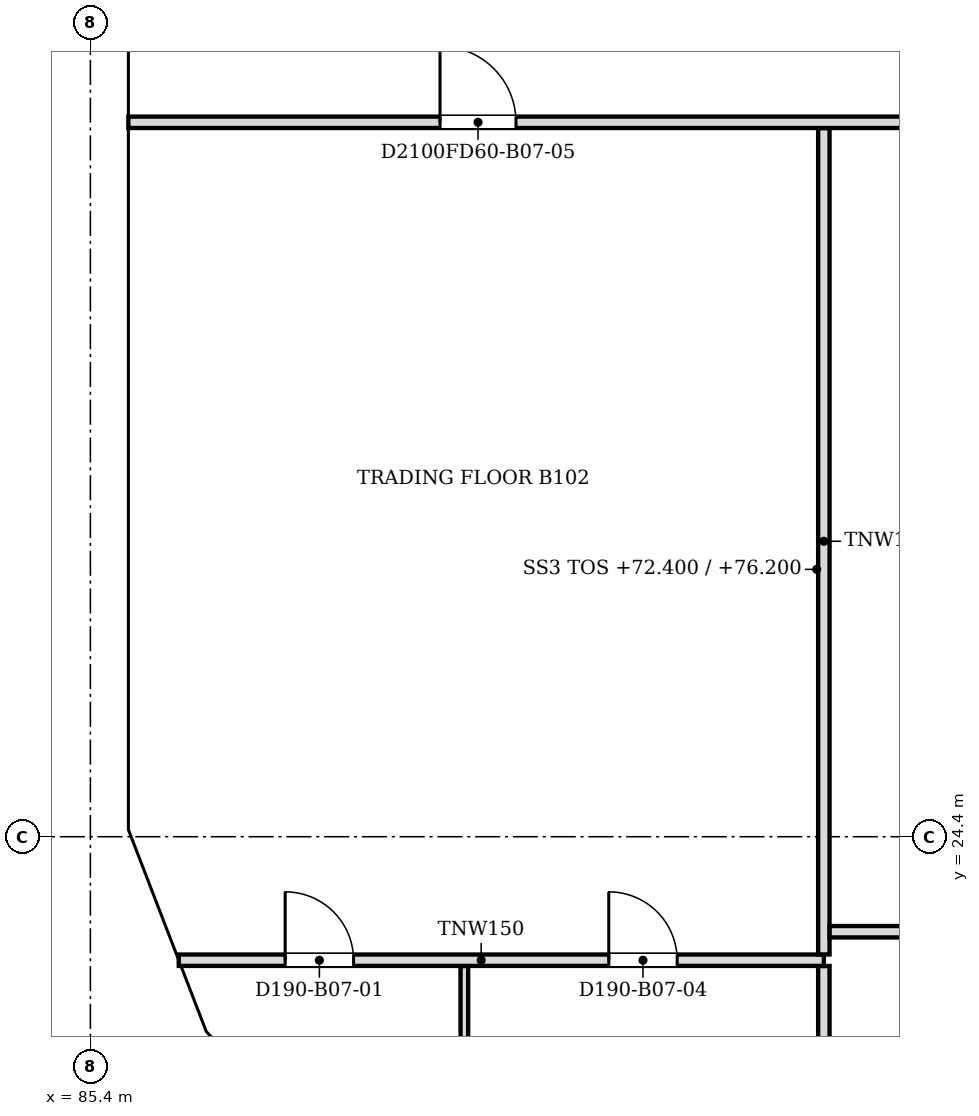
"""IFC4 building model, lengths in metres.
Left out: names, types, materials, properties, quantities, classifications, styles, units other than length and angle.
Written with IfcOpenShell. Run it as: python <this file> out.ifc"""

import sys

from ifc_helpers import new_model, si_unit, direction, frame, frame_2d, origin, place, context, subcontext, project, spatial, polyline, rectangle, outline, extrude, faceted_brep, source, transform, mapped, element, fill, save


model = new_model("IFC4")
c1 = context("Model", 3, precision=1e-05, world=origin(), true_north=direction((0.0, 1.0)))
c2 = subcontext(c1, "Body", "Model", "MODEL_VIEW")
j1 = project(units=[si_unit("LENGTHUNIT", "METRE"), si_unit("PLANEANGLEUNIT", "RADIAN")], contexts=[c1])
p1 = place(None, origin())
s1 = spatial("IfcSite", under=j1, at=p1, CompositionType="ELEMENT")
p2 = place(p1, origin())
s2 = spatial("IfcBuilding", under=s1, at=p2, CompositionType="ELEMENT")
p3 = place(p2, frame((0.0, 0.0, 72.4)))
s3 = spatial("IfcBuildingStorey", under=s2, at=p3, CompositionType="ELEMENT", Elevation=72.4)
m1 = source(origin(), c2, "Body", "Brep", [
    faceted_brep([(3.05, -0.25, 0.0), (6.1, -0.25, 3.8), (6.1, -0.25, 3.8), (3.05, -0.25, 7.6), (0.0, -0.25, 3.8), (0.0, 0.25, 3.8), (3.05, 0.25, 7.6), (6.1, 0.25, 3.8), (6.1, 0.25, 3.8), (3.05, 0.25, 0.0)], [[[0, 1, 2, 3, 4]], [[5, 6, 7, 8, 9]], [[9, 8, 1, 0]], [[7, 6, 3, 2]], [[6, 5, 4, 3]], [[5, 9, 0, 4]], [[1, 8, 7, 2]]]),
])
p4 = place(p3, frame((85.65, 39.65, -3.8), z_axis=(0.0, 0.0, 1.0), x_axis=(0.0, -1.0, 0.0)))
e1 = element("IfcWall", 1, at=p4, inside=s3, PredefinedType="SOLIDWALL", context=c2, shape_type="MappedRepresentation", body=[
    mapped(m1, transform((0.0, 0.0, 0.0), scale=1.0)),
])
m2 = source(origin(), c2, "Body", "SweptSolid", [
    extrude(outline(polyline([(3.05, 0.399), (5.78, 3.8), (3.05, 7.2), (0.321, 3.8), (3.05, 0.399)])), frame((0.0, 0.26, 0.0), z_axis=(0.0, -1.0, 0.0), x_axis=(1.0, 0.0, 0.0)), (0.0, 0.0, 1.0), 0.52),
])
p5 = place(p4, origin())
e2 = element("IfcOpeningElement", 2, at=p5, cuts=e1, PredefinedType="OPENING", context=c2, shape_type="MappedRepresentation", body=[
    mapped(m2, transform((0.0, 0.0, 0.0), scale=1.0)),
])
m3 = source(origin(), c2, "Body", "SweptSolid", [
    extrude(outline(polyline([(3.05, 0.0), (6.1, 3.8), (3.05, 7.6), (0.0, 3.8), (3.05, 0.0)])), frame((0.0, 0.25, 0.0), z_axis=(0.0, -1.0, 0.0), x_axis=(1.0, 0.0, 0.0)), (0.0, 0.0, 1.0), 0.5),
])
p6 = place(p3, frame((85.65, 33.55, -3.8), z_axis=(0.0, 0.0, 1.0), x_axis=(0.0, -1.0, 0.0)))
e3 = element("IfcWall", 3, at=p6, inside=s3, PredefinedType="SOLIDWALL", context=c2, shape_type="MappedRepresentation", body=[
    mapped(m3, transform((0.0, 0.0, 0.0), scale=1.0)),
])
p7 = place(p6, origin())
e4 = element("IfcOpeningElement", 4, at=p7, cuts=e3, PredefinedType="OPENING", context=c2, shape_type="MappedRepresentation", body=[
    mapped(m2, transform((0.0, 0.0, 0.0), scale=1.0)),
])
m4 = source(origin(), c2, "Body", "Brep", [
    faceted_brep([(3.003, -0.25, 0.0), (3.05, -0.25, 0.06), (3.05, -0.25, 7.54), (3.003, -0.25, 7.6), (0.0, -0.25, 3.8), (0.0, 0.25, 3.8), (2.957, 0.25, 7.541), (2.957, 0.25, 0.059), (3.003, 0.0, 0.0), (3.003, 0.0, 7.6)], [[[0, 1, 2, 3, 4]], [[5, 6, 7]], [[1, 0, 8]], [[9, 3, 2]], [[6, 5, 4, 3, 9]], [[5, 7, 8, 0, 4]], [[1, 8, 7, 6, 9, 2]]]),
])
p8 = place(p3, frame((85.65, 27.45, -3.8), z_axis=(0.0, 0.0, 1.0), x_axis=(0.0, -1.0, 0.0)))
e5 = element("IfcWall", 5, at=p8, inside=s3, PredefinedType="SOLIDWALL", context=c2, shape_type="MappedRepresentation", body=[
    mapped(m4, transform((0.0, 0.0, 0.0), scale=1.0)),
])
m5 = source(origin(), c2, "Body", "SweptSolid", [
    extrude(outline(polyline([(2.803, 6.944), (0.319, 3.8), (2.803, 0.656), (2.803, 6.944)])), frame((0.0, 0.26, 0.0), z_axis=(0.0, -1.0, 0.0), x_axis=(1.0, 0.0, 0.0)), (0.0, 0.0, 1.0), 0.52),
])
p9 = place(p8, origin())
e6 = element("IfcOpeningElement", 6, at=p9, cuts=e5, PredefinedType="OPENING", context=c2, shape_type="MappedRepresentation", body=[
    mapped(m5, transform((0.0, 0.0, 0.0), scale=1.0)),
])
m6 = source(origin(), c2, "Body", "Brep", [
    faceted_brep([(0.047, -0.25, 0.0), (2.997, -0.25, 3.8), (0.047, -0.25, 7.6), (0.0, -0.25, 7.541), (0.0, -0.25, 0.059), (0.093, 0.25, 7.54), (2.944, 0.25, 3.868), (2.944, 0.25, 3.732), (0.093, 0.25, 0.06), (2.997, 0.0, 3.8), (0.047, 0.0, 0.0), (0.047, 0.0, 7.6)], [[[0, 1, 2, 3, 4]], [[5, 6, 7, 8]], [[8, 7, 9, 1, 0, 10]], [[6, 5, 11, 2, 1, 9]], [[3, 2, 11]], [[10, 0, 4]], [[8, 10, 4, 3, 11, 5]], [[9, 7, 6]]]),
])
p10 = place(p3, frame((85.633, 24.49, -3.8), z_axis=(0.0, 0.0, 1.0), x_axis=(0.359901446078, -0.932990326376, 0.0)))
e7 = element("IfcWall", 7, at=p10, inside=s3, PredefinedType="SOLIDWALL", context=c2, shape_type="MappedRepresentation", body=[
    mapped(m6, transform((0.0, 0.0, 0.0), scale=1.0)),
])
m7 = source(origin(), c2, "Body", "SweptSolid", [
    extrude(outline(polyline([(0.247, 0.665), (2.681, 3.8), (0.247, 6.935), (0.247, 0.665)])), frame((0.0, 0.26, 0.0), z_axis=(0.0, -1.0, 0.0), x_axis=(1.0, 0.0, 0.0)), (0.0, 0.0, 1.0), 0.52),
])
p11 = place(p10, origin())
e8 = element("IfcOpeningElement", 8, at=p11, cuts=e7, PredefinedType="OPENING", context=c2, shape_type="MappedRepresentation", body=[
    mapped(m7, transform((0.0, 0.0, 0.0), scale=1.0)),
])
m8 = source(origin(), c2, "Body", "Brep", [
    faceted_brep([(2.944, -0.25, 0.0), (2.997, -0.25, 0.068), (2.997, -0.25, 7.532), (2.944, -0.25, 7.6), (0.0, -0.25, 3.8), (0.053, 0.25, 3.868), (2.891, 0.25, 7.532), (2.891, 0.25, 0.068), (0.053, 0.25, 3.731), (2.944, 0.0, 0.0), (2.944, 0.0, 7.6), (0.0, 0.0, 3.8)], [[[0, 1, 2, 3, 4]], [[5, 6, 7, 8]], [[1, 0, 9]], [[10, 3, 2]], [[6, 5, 11, 4, 3, 10]], [[8, 7, 9, 0, 4, 11]], [[8, 11, 5]], [[1, 9, 7, 6, 10, 2]]]),
])
p12 = place(p3, frame((86.712, 21.694, -3.8), z_axis=(0.0, 0.0, 1.0), x_axis=(0.707066050402, -0.707147509625, 0.0)))
e9 = element("IfcWall", 9, at=p12, inside=s3, PredefinedType="SOLIDWALL", context=c2, shape_type="MappedRepresentation", body=[
    mapped(m8, transform((0.0, 0.0, 0.0), scale=1.0)),
])
m9 = source(origin(), c2, "Body", "SweptSolid", [
    extrude(outline(polyline([(2.744, 6.934), (0.316, 3.8), (2.744, 0.666), (2.744, 6.934)])), frame((0.0, 0.26, 0.0), z_axis=(0.0, -1.0, 0.0), x_axis=(1.0, 0.0, 0.0)), (0.0, 0.0, 1.0), 0.52),
])
p13 = place(p12, origin())
e10 = element("IfcOpeningElement", 10, at=p13, cuts=e9, PredefinedType="OPENING", context=c2, shape_type="MappedRepresentation", body=[
    mapped(m9, transform((0.0, 0.0, 0.0), scale=1.0)),
])
p14 = place(p2, frame((0.0, 0.0, 76.2)))
s4 = spatial("IfcBuildingStorey", under=s2, at=p14, CompositionType="ELEMENT", Elevation=76.2)
m10 = source(origin(), c2, "Body", "SweptSolid", [
    extrude(outline(polyline([(3.05, 0.0), (6.1, 3.8), (3.05, 7.6), (0.0, 3.8), (3.05, 0.0)])), frame((0.0, 0.25, 0.0), z_axis=(0.0, -1.0, 0.0), x_axis=(1.0, 0.0, 0.0)), (0.0, 0.0, 1.0), 0.5),
])
p15 = place(p14, frame((85.65, 36.6, -3.8), z_axis=(0.0, 0.0, 1.0), x_axis=(0.0, -1.0, 0.0)))
e11 = element("IfcWall", 11, at=p15, inside=s4, PredefinedType="SOLIDWALL", context=c2, shape_type="MappedRepresentation", body=[
    mapped(m10, transform((0.0, 0.0, 0.0), scale=1.0)),
])
m11 = source(origin(), c2, "Body", "SweptSolid", [
    extrude(outline(polyline([(3.05, 0.399), (5.78, 3.8), (3.05, 7.201), (0.321, 3.8), (3.05, 0.399)])), frame((0.0, 0.26, 0.0), z_axis=(0.0, -1.0, 0.0), x_axis=(1.0, 0.0, 0.0)), (0.0, 0.0, 1.0), 0.52),
])
p16 = place(p15, origin())
e12 = element("IfcOpeningElement", 12, at=p16, cuts=e11, PredefinedType="OPENING", context=c2, shape_type="MappedRepresentation", body=[
    mapped(m11, transform((0.0, 0.0, 0.0), scale=1.0)),
])
m12 = source(origin(), c2, "Body", "Brep", [
    faceted_brep([(3.05, -0.25, 0.0), (6.053, -0.25, 3.8), (3.05, -0.25, 7.6), (0.0, -0.25, 3.8), (0.0, 0.25, 3.8), (3.05, 0.25, 7.6), (6.007, 0.25, 3.859), (6.007, 0.25, 3.741), (3.05, 0.25, 0.0), (6.053, 0.0, 3.8)], [[[0, 1, 2, 3]], [[4, 5, 6, 7, 8]], [[8, 7, 9, 1, 0]], [[6, 5, 2, 1, 9]], [[5, 4, 3, 2]], [[4, 8, 0, 3]], [[9, 7, 6]]]),
])
p17 = place(p14, frame((85.65, 30.5, -3.8), z_axis=(0.0, 0.0, 1.0), x_axis=(0.0, -1.0, 0.0)))
e13 = element("IfcWall", 13, at=p17, inside=s4, PredefinedType="SOLIDWALL", context=c2, shape_type="MappedRepresentation", body=[
    mapped(m12, transform((0.0, 0.0, 0.0), scale=1.0)),
])
m13 = source(origin(), c2, "Body", "SweptSolid", [
    extrude(outline(polyline([(3.049, 0.401), (5.735, 3.8), (3.049, 7.199), (0.321, 3.8), (3.049, 0.401)])), frame((0.0, 0.26, 0.0), z_axis=(0.0, -1.0, 0.0), x_axis=(1.0, 0.0, 0.0)), (0.0, 0.0, 1.0), 0.52),
])
p18 = place(p17, origin())
e14 = element("IfcOpeningElement", 14, at=p18, cuts=e13, PredefinedType="OPENING", context=c2, shape_type="MappedRepresentation", body=[
    mapped(m13, transform((0.0, 0.0, 0.0), scale=1.0)),
])
m14 = source(origin(), c2, "Body", "Brep", [
    faceted_brep([(2.95, -0.25, 0.0), (3.003, -0.25, 0.068), (3.003, -0.25, 7.532), (2.95, -0.25, 7.6), (0.0, -0.25, 3.8), (0.047, 0.25, 3.86), (2.898, 0.25, 7.532), (2.898, 0.25, 0.068), (0.047, 0.25, 3.74), (2.95, 0.0, 0.0), (2.95, 0.0, 7.6), (0.0, 0.0, 3.8)], [[[0, 1, 2, 3, 4]], [[5, 6, 7, 8]], [[1, 0, 9]], [[10, 3, 2]], [[6, 5, 11, 4, 3, 10]], [[8, 7, 9, 0, 4, 11]], [[8, 11, 5]], [[1, 9, 7, 6, 10, 2]]]),
])
p19 = place(p14, frame((85.65, 24.447, -3.8), z_axis=(0.0, 0.0, 1.0), x_axis=(0.35992665181, -0.932980602862, 0.0)))
e15 = element("IfcWall", 15, at=p19, inside=s4, PredefinedType="SOLIDWALL", context=c2, shape_type="MappedRepresentation", body=[
    mapped(m14, transform((0.0, 0.0, 0.0), scale=1.0)),
])
m15 = source(origin(), c2, "Body", "SweptSolid", [
    extrude(outline(polyline([(2.75, 6.935), (0.316, 3.8), (2.75, 0.665), (2.75, 6.935)])), frame((0.0, 0.26, 0.0), z_axis=(0.0, -1.0, 0.0), x_axis=(1.0, 0.0, 0.0)), (0.0, 0.0, 1.0), 0.52),
])
p20 = place(p19, origin())
e16 = element("IfcOpeningElement", 16, at=p20, cuts=e15, PredefinedType="OPENING", context=c2, shape_type="MappedRepresentation", body=[
    mapped(m15, transform((0.0, 0.0, 0.0), scale=1.0)),
])
m16 = source(origin(), c2, "Body", "Brep", [
    faceted_brep([(0.053, -0.25, 0.0), (2.997, -0.25, 3.8), (0.053, -0.25, 7.6), (0.0, -0.25, 7.532), (0.0, -0.25, 0.068), (0.106, 0.25, 7.532), (2.944, 0.25, 3.868), (2.944, 0.25, 3.732), (0.106, 0.25, 0.068), (2.997, 0.0, 3.8), (0.053, 0.0, 0.0), (0.053, 0.0, 7.6)], [[[0, 1, 2, 3, 4]], [[5, 6, 7, 8]], [[8, 7, 9, 1, 0, 10]], [[6, 5, 11, 2, 1, 9]], [[3, 2, 11]], [[10, 0, 4]], [[8, 10, 4, 3, 11, 5]], [[9, 7, 6]]]),
])
p21 = place(p14, frame((86.675, 21.731, -3.8), z_axis=(0.0, 0.0, 1.0), x_axis=(0.707106781187, -0.707106781187, 0.0)))
e17 = element("IfcWall", 17, at=p21, inside=s4, PredefinedType="SOLIDWALL", context=c2, shape_type="MappedRepresentation", body=[
    mapped(m16, transform((0.0, 0.0, 0.0), scale=1.0)),
])
m17 = source(origin(), c2, "Body", "SweptSolid", [
    extrude(outline(polyline([(0.253, 0.667), (2.681, 3.8), (0.253, 6.934), (0.253, 0.667)])), frame((0.0, 0.26, 0.0), z_axis=(0.0, -1.0, 0.0), x_axis=(1.0, 0.0, 0.0)), (0.0, 0.0, 1.0), 0.52),
])
p22 = place(p21, origin())
e18 = element("IfcOpeningElement", 18, at=p22, cuts=e17, PredefinedType="OPENING", context=c2, shape_type="MappedRepresentation", body=[
    mapped(m17, transform((0.0, 0.0, 0.0), scale=1.0)),
])
p23 = place(p3, frame((95.05, 18.8, 0.0), z_axis=(0.0, 0.0, 1.0), x_axis=(0.0, 1.0, 0.0)))
e19 = element("IfcWall", 19, at=p23, inside=s3, PredefinedType="PARTITIONING", context=c2, shape_type="SweptSolid", body=[
    extrude(rectangle(XDim=3.899, YDim=0.15, at=frame_2d((1.949, 0.0))), origin(), (0.0, 0.0, 1.0), 3.067),
])
p24 = place(p3, frame((90.32, 19.291, 0.0), z_axis=(0.0, 0.0, 1.0), x_axis=(0.0, 1.0, 0.0)))
e20 = element("IfcWall", 20, at=p24, inside=s3, PredefinedType="PARTITIONING", context=c2, shape_type="SweptSolid", body=[
    extrude(rectangle(XDim=3.408, YDim=0.1, at=frame_2d((1.704, 0.0))), origin(), (0.0, 0.0, 1.0), 3.067),
])
p25 = place(p3, frame((95.05, 22.775, 0.0), z_axis=(0.0, 0.0, 1.0), x_axis=(-1.0, 0.0, 0.0)))
e21 = element("IfcWall", 21, at=p25, inside=s3, PredefinedType="PARTITIONING", context=c2, shape_type="SweptSolid", body=[
    extrude(rectangle(XDim=8.487, YDim=0.15, at=frame_2d((4.244, 0.0))), origin(), (0.0, 0.0, 1.0), 3.067),
])
m18 = source(origin(), c2, "Body", "SweptSolid", [
    extrude(rectangle(XDim=0.9, YDim=2.1, at=frame_2d((0.45, 1.05))), frame((0.0, 0.085, 0.0), z_axis=(0.0, -1.0, 0.0), x_axis=(1.0, 0.0, 0.0)), (0.0, 0.0, 1.0), 0.17),
])
p26 = place(p25, frame((6.187, 0.0, 0.0)))
e22 = element("IfcOpeningElement", 22, at=p26, cuts=e21, PredefinedType="OPENING", context=c2, shape_type="MappedRepresentation", body=[
    mapped(m18, transform((0.0, 0.0, 0.0), scale=1.0)),
])
p27 = place(p25, frame((1.93, 0.0, 0.0)))
e23 = element("IfcOpeningElement", 23, at=p27, cuts=e21, PredefinedType="OPENING", context=c2, shape_type="MappedRepresentation", body=[
    mapped(m18, transform((0.0, 0.0, 0.0), scale=1.0)),
])
p28 = place(p3, frame((95.05, 22.851, 0.0), z_axis=(0.0, 0.0, 1.0), x_axis=(0.0, 1.0, 0.0)))
e24 = element("IfcWall", 24, at=p28, inside=s3, PredefinedType="PARTITIONING", context=c2, shape_type="SweptSolid", body=[
    extrude(rectangle(XDim=10.873, YDim=0.15, at=frame_2d((5.437, 0.0))), origin(), (0.0, 0.0, 1.0), 3.067),
])
p29 = place(p3, frame((107.25, 23.15, 0.0), z_axis=(0.0, 0.0, 1.0), x_axis=(-1.0, 0.0, 0.0)))
e25 = element("IfcWall", 25, at=p29, inside=s3, PredefinedType="PARTITIONING", context=c2, shape_type="SweptSolid", body=[
    extrude(rectangle(XDim=12.124, YDim=0.15, at=frame_2d((6.062, 0.0))), origin(), (0.0, 0.0, 1.0), 3.067),
])
p30 = place(p29, frame((8.324, 0.0, 0.0)))
e26 = element("IfcOpeningElement", 26, at=p30, cuts=e25, PredefinedType="OPENING", context=c2, shape_type="MappedRepresentation", body=[
    mapped(m18, transform((0.0, 0.0, 0.0), scale=1.0)),
])
p31 = place(p29, frame((2.706, 0.0, 0.0)))
e27 = element("IfcOpeningElement", 27, at=p31, cuts=e25, PredefinedType="OPENING", context=c2, shape_type="MappedRepresentation", body=[
    mapped(m18, transform((0.0, 0.0, 0.0), scale=1.0)),
])
p32 = place(p3, frame((133.7, 33.8, 0.0), z_axis=(0.0, 0.0, 1.0), x_axis=(-1.0, 0.0, 0.0)))
e28 = element("IfcWall", 28, at=p32, inside=s3, PredefinedType="PARTITIONING", context=c2, shape_type="SweptSolid", body=[
    extrude(rectangle(XDim=47.8, YDim=0.15, at=frame_2d((23.9, 0.0))), origin(), (0.0, 0.0, 1.0), 3.067),
])
m19 = source(origin(), c2, "Body", "SweptSolid", [
    extrude(rectangle(XDim=1.0, YDim=2.1, at=frame_2d((0.5, 1.05))), frame((0.0, 0.085, 0.0), z_axis=(0.0, -1.0, 0.0), x_axis=(1.0, 0.0, 0.0)), (0.0, 0.0, 1.0), 0.17),
])
p33 = place(p32, frame((3.549, 0.0, 0.0)))
e29 = element("IfcOpeningElement", 29, at=p33, cuts=e28, PredefinedType="OPENING", context=c2, shape_type="MappedRepresentation", body=[
    mapped(m19, transform((0.0, 0.0, 0.0), scale=1.0)),
])
p34 = place(p32, frame((42.7, 0.0, 0.0)))
e30 = element("IfcOpeningElement", 30, at=p34, cuts=e28, PredefinedType="OPENING", context=c2, shape_type="MappedRepresentation", body=[
    mapped(m19, transform((0.0, 0.0, 0.0), scale=1.0)),
])
p35 = place(p32, frame((12.199, 0.0, 0.0)))
e31 = element("IfcOpeningElement", 31, at=p35, cuts=e28, PredefinedType="OPENING", context=c2, shape_type="MappedRepresentation", body=[
    mapped(m19, transform((0.0, 0.0, 0.0), scale=1.0)),
])
p36 = place(p32, frame((21.349, 0.0, 0.0)))
e32 = element("IfcOpeningElement", 32, at=p36, cuts=e28, PredefinedType="OPENING", context=c2, shape_type="MappedRepresentation", body=[
    mapped(m19, transform((0.0, 0.0, 0.0), scale=1.0)),
])
p37 = place(p32, frame((32.05, 0.0, 0.0)))
e33 = element("IfcOpeningElement", 33, at=p37, cuts=e28, PredefinedType="OPENING", context=c2, shape_type="MappedRepresentation", body=[
    mapped(m19, transform((0.0, 0.0, 0.0), scale=1.0)),
])
m20 = source(origin(), c2, "Body", "SweptSolid", [
    extrude(rectangle(XDim=0.9, YDim=2.1, at=frame_2d((0.45, 1.05))), frame((0.0, 0.025, 0.0), z_axis=(0.0, -1.0, 0.0), x_axis=(1.0, 0.0, 0.0)), (0.0, 0.0, 1.0), 0.05),
])
p38 = place(p26, origin())
e34 = element("IfcDoor", 34, at=p38, inside=s3, OperationType="SINGLE_SWING_RIGHT", PredefinedType="DOOR", context=c2, shape_type="MappedRepresentation", body=[
    mapped(m20, transform((0.0, 0.0, 0.0), scale=1.0)),
])
fill(e22, e34)
p39 = place(p27, origin())
e35 = element("IfcDoor", 35, at=p39, inside=s3, OperationType="SINGLE_SWING_RIGHT", PredefinedType="DOOR", context=c2, shape_type="MappedRepresentation", body=[
    mapped(m20, transform((0.0, 0.0, 0.0), scale=1.0)),
])
fill(e23, e35)
m21 = source(origin(), c2, "Body", "SweptSolid", [
    extrude(rectangle(XDim=1.0, YDim=2.1, at=frame_2d((0.5, 1.05))), frame((0.0, 0.025, 0.0), z_axis=(0.0, -1.0, 0.0), x_axis=(1.0, 0.0, 0.0)), (0.0, 0.0, 1.0), 0.05),
])
p40 = place(p34, origin())
e36 = element("IfcDoor", 36, at=p40, inside=s3, OperationType="SINGLE_SWING_RIGHT", PredefinedType="DOOR", context=c2, shape_type="MappedRepresentation", body=[
    mapped(m21, transform((0.0, 0.0, 0.0), scale=1.0)),
])
fill(e30, e36)
save(model, sys.argv[1])
